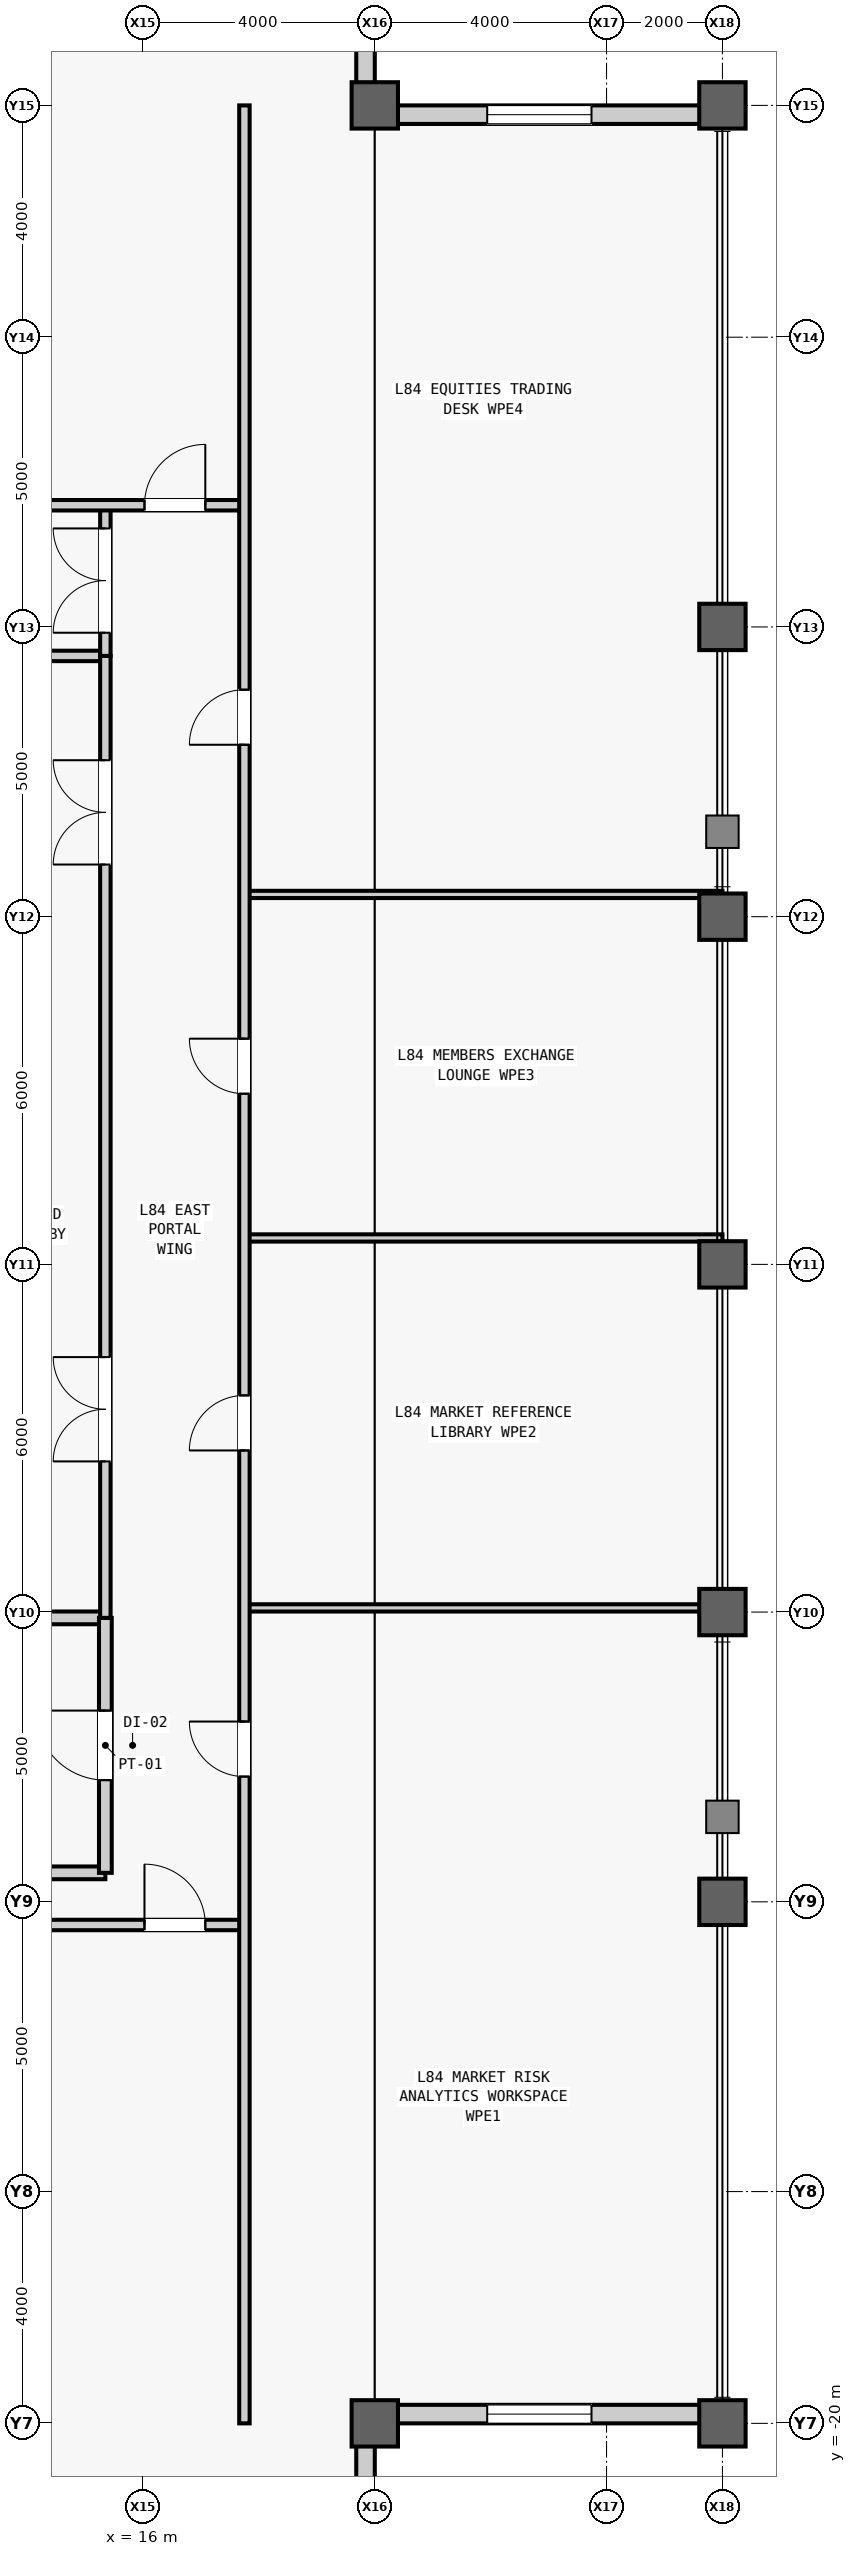
"""IFC4 building model, lengths in metres.
Left out: names, types, materials, properties, quantities, classifications, styles, units other than length and angle.
Written with IfcOpenShell. Run it as: python <this file> out.ifc"""

import sys

from ifc_helpers import new_model, si_unit, direction, frame, frame_2d, origin, origin_2d, place, context, subcontext, project, spatial, rectangle, hollow_rectangle, extrude, source, transform, mapped, element, fill, save


model = new_model("IFC4")
c1 = context("Model", 3, precision=1e-05, world=origin(), true_north=direction((0.0, 1.0)))
c2 = subcontext(c1, "Body", "Model", "MODEL_VIEW")
j1 = project(units=[si_unit("LENGTHUNIT", "METRE"), si_unit("PLANEANGLEUNIT", "RADIAN")], contexts=[c1])
p1 = place(None, origin())
s1 = spatial("IfcSite", under=j1, at=p1, CompositionType="ELEMENT")
p2 = place(p1, origin())
s2 = spatial("IfcBuilding", under=s1, at=p2, CompositionType="ELEMENT")
p3 = place(p2, frame((0.0, 0.0, 354.3)))
s3 = spatial("IfcBuildingStorey", under=s2, at=p3, CompositionType="ELEMENT", Elevation=354.3)
m1 = source(origin(), c2, "Body", "SweptSolid", [
    extrude(hollow_rectangle(XDim=0.8, YDim=0.8, WallThickness=0.045, at=origin_2d()), origin(), (0.0, 0.0, 1.0), 4.0),
])
for number, where, z_axis, x_axis in (
    (1, (20.0, -20.0, 0.0), (0.0, 0.0, 1.0), (1.0, 0.0, 0.0)),
    (2, (20.0, 20.0, 0.0), (0.0, 0.0, 1.0), (1.0, 0.0, 0.0)),
    (3, (26.0, -20.0, 0.0), (0.0, 0.0, 1.0), (1.0, 0.0, 0.0)),
    (4, (26.0, -11.0, 0.0), (0.0, 0.0, 1.0), (1.0, 0.0, 0.0)),
    (5, (26.0, -6.0, 0.0), (0.0, 0.0, 1.0), (1.0, 0.0, 0.0)),
    (6, (26.0, 0.0, 0.0), (0.0, 0.0, 1.0), (1.0, 0.0, 0.0)),
    (7, (26.0, 6.0, 0.0), (0.0, 0.0, 1.0), (1.0, 0.0, 0.0)),
    (8, (26.0, 11.0, 0.0), (0.0, 0.0, 1.0), (1.0, 0.0, 0.0)),
    (9, (26.0, 20.0, 0.0), (0.0, 0.0, 1.0), (1.0, 0.0, 0.0)),
):
    element("IfcColumn", number, at=place(p3, frame(where, z_axis=z_axis, x_axis=x_axis)), inside=s3, PredefinedType="COLUMN", context=c2, shape_type="MappedRepresentation", body=[
        mapped(m1, transform((0.0, 0.0, 0.0), scale=1.0)),
    ])
m2 = source(origin(), c2, "Body", "SweptSolid", [
    extrude(rectangle(XDim=5.68, YDim=0.32, at=frame_2d((2.84, 0.0))), origin(), (0.0, 0.0, 1.0), 3.191),
])
p4 = place(p3, frame((19.84, -25.68, 0.0), z_axis=(0.0, 0.0, 1.0), x_axis=(0.0, 1.0, 0.0)))
e10 = element("IfcWall", 10, at=p4, inside=s3, PredefinedType="STANDARD", context=c2, shape_type="MappedRepresentation", body=[
    mapped(m2, transform((0.0, 0.0, 0.0), scale=1.0)),
])
m3 = source(origin(), c2, "Body", "SweptSolid", [
    extrude(rectangle(XDim=1.8, YDim=2.4, at=frame_2d((0.9, 1.2))), frame((0.0, 0.17, 0.0), z_axis=(0.0, -1.0, 0.0), x_axis=(1.0, 0.0, 0.0)), (0.0, 0.0, 1.0), 0.34),
])
p5 = place(p4, frame((1.94, 0.0, 0.5)))
e11 = element("IfcOpeningElement", 11, at=p5, cuts=e10, PredefinedType="OPENING", context=c2, shape_type="MappedRepresentation", body=[
    mapped(m3, transform((0.0, 0.0, 0.0), scale=1.0)),
])
p6 = place(p3, frame((20.0, -19.84, 0.0), z_axis=(0.0, 0.0, 1.0), x_axis=(1.0, 0.0, 0.0)))
e12 = element("IfcWall", 12, at=p6, inside=s3, PredefinedType="STANDARD", context=c2, shape_type="MappedRepresentation", body=[
    mapped(m2, transform((0.0, 0.0, 0.0), scale=1.0)),
])
p7 = place(p6, frame((1.94, 0.0, 0.5)))
e13 = element("IfcOpeningElement", 13, at=p7, cuts=e12, PredefinedType="OPENING", context=c2, shape_type="MappedRepresentation", body=[
    mapped(m3, transform((0.0, 0.0, 0.0), scale=1.0)),
])
p8 = place(p3, frame((20.0, 19.84, 0.0), z_axis=(0.0, 0.0, 1.0), x_axis=(1.0, 0.0, 0.0)))
e14 = element("IfcWall", 14, at=p8, inside=s3, PredefinedType="STANDARD", context=c2, shape_type="MappedRepresentation", body=[
    mapped(m2, transform((0.0, 0.0, 0.0), scale=1.0)),
])
p9 = place(p8, frame((1.94, 0.0, 0.5)))
e15 = element("IfcOpeningElement", 15, at=p9, cuts=e14, PredefinedType="OPENING", context=c2, shape_type="MappedRepresentation", body=[
    mapped(m3, transform((0.0, 0.0, 0.0), scale=1.0)),
])
p10 = place(p3, frame((19.84, 20.0, 0.0), z_axis=(0.0, 0.0, 1.0), x_axis=(0.0, 1.0, 0.0)))
e16 = element("IfcWall", 16, at=p10, inside=s3, PredefinedType="STANDARD", context=c2, shape_type="MappedRepresentation", body=[
    mapped(m2, transform((0.0, 0.0, 0.0), scale=1.0)),
])
p11 = place(p10, frame((1.94, 0.0, 0.5)))
e17 = element("IfcOpeningElement", 17, at=p11, cuts=e16, PredefinedType="OPENING", context=c2, shape_type="MappedRepresentation", body=[
    mapped(m3, transform((0.0, 0.0, 0.0), scale=1.0)),
])
m4 = source(origin(), c2, "Body", "SweptSolid", [
    extrude(rectangle(XDim=4.05, YDim=0.22, at=frame_2d((2.025, 0.0))), origin(), (0.0, 0.0, 1.0), 3.74),
])
p12 = place(p3, frame((11.3, -10.5, 0.0), z_axis=(0.0, 0.0, 1.0), x_axis=(1.0, 0.0, 0.0)))
e18 = element("IfcWall", 18, at=p12, inside=s3, PredefinedType="PARTITIONING", context=c2, shape_type="MappedRepresentation", body=[
    mapped(m4, transform((0.0, 0.0, 0.0), scale=1.0)),
])
m5 = source(origin(), c2, "Body", "SweptSolid", [
    extrude(rectangle(XDim=4.05, YDim=0.22, at=frame_2d((2.025, 0.0))), origin(), (0.0, 0.0, 1.0), 3.124),
])
p13 = place(p3, frame((11.3, -6.1, 0.0), z_axis=(0.0, 0.0, 1.0), x_axis=(1.0, 0.0, 0.0)))
e19 = element("IfcWall", 19, at=p13, inside=s3, PredefinedType="PARTITIONING", context=c2, shape_type="MappedRepresentation", body=[
    mapped(m5, transform((0.0, 0.0, 0.0), scale=1.0)),
])
m6 = source(origin(), c2, "Body", "SweptSolid", [
    extrude(rectangle(XDim=4.4, YDim=0.22, at=frame_2d((2.2, 0.0))), origin(), (0.0, 0.0, 1.0), 3.74),
])
p14 = place(p3, frame((15.35, -10.5, 0.0), z_axis=(0.0, 0.0, 1.0), x_axis=(0.0, 1.0, 0.0)))
e20 = element("IfcWall", 20, at=p14, inside=s3, PredefinedType="PARTITIONING", context=c2, shape_type="MappedRepresentation", body=[
    mapped(m6, transform((0.0, 0.0, 0.0), scale=1.0)),
])
m7 = source(origin(), c2, "Body", "SweptSolid", [
    extrude(rectangle(XDim=1.2, YDim=2.2, at=frame_2d((0.6, 1.1))), frame((0.0, 0.12, 0.0), z_axis=(0.0, -1.0, 0.0), x_axis=(1.0, 0.0, 0.0)), (0.0, 0.0, 1.0), 0.24),
])
p15 = place(p14, frame((1.6, 0.0, 0.0)))
e21 = element("IfcOpeningElement", 21, at=p15, cuts=e20, PredefinedType="OPENING", context=c2, shape_type="MappedRepresentation", body=[
    mapped(m7, transform((0.0, 0.0, 0.0), scale=1.0)),
])
m8 = source(origin(), c2, "Body", "SweptSolid", [
    extrude(rectangle(XDim=4.05, YDim=0.18, at=frame_2d((2.025, 0.0))), origin(), (0.0, 0.0, 1.0), 3.74),
])
p16 = place(p3, frame((11.3, 10.5, 0.0), z_axis=(0.0, 0.0, 1.0), x_axis=(1.0, 0.0, 0.0)))
e22 = element("IfcWall", 22, at=p16, inside=s3, PredefinedType="PARTITIONING", context=c2, shape_type="MappedRepresentation", body=[
    mapped(m8, transform((0.0, 0.0, 0.0), scale=1.0)),
])
m9 = source(origin(), c2, "Body", "SweptSolid", [
    extrude(rectangle(XDim=16.6, YDim=0.18, at=frame_2d((8.3, 0.0))), origin(), (0.0, 0.0, 1.0), 3.74),
])
p17 = place(p3, frame((15.35, -6.1, 0.0), z_axis=(0.0, 0.0, 1.0), x_axis=(0.0, 1.0, 0.0)))
e23 = element("IfcWall", 23, at=p17, inside=s3, PredefinedType="PARTITIONING", context=c2, shape_type="MappedRepresentation", body=[
    mapped(m9, transform((0.0, 0.0, 0.0), scale=1.0)),
])
m10 = source(origin(), c2, "Body", "SweptSolid", [
    extrude(rectangle(XDim=1.8, YDim=2.25, at=frame_2d((0.9, 1.125))), frame((0.0, 0.1, 0.0), z_axis=(0.0, -1.0, 0.0), x_axis=(1.0, 0.0, 0.0)), (0.0, 0.0, 1.0), 0.2),
])
p18 = place(p17, frame((2.7, 0.0, 0.0)))
e24 = element("IfcOpeningElement", 24, at=p18, cuts=e23, PredefinedType="OPENING", context=c2, shape_type="MappedRepresentation", body=[
    mapped(m10, transform((0.0, 0.0, 0.0), scale=1.0)),
])
p19 = place(p17, frame((13.0, 0.0, 0.0)))
e25 = element("IfcOpeningElement", 25, at=p19, cuts=e23, PredefinedType="OPENING", context=c2, shape_type="MappedRepresentation", body=[
    mapped(m10, transform((0.0, 0.0, 0.0), scale=1.0)),
])
m11 = source(origin(), c2, "Body", "SweptSolid", [
    extrude(rectangle(XDim=2.6, YDim=0.18, at=frame_2d((1.3, 0.0))), origin(), (0.0, 0.0, 1.0), 3.74),
])
p20 = place(p3, frame((15.35, 10.5, 0.0), z_axis=(0.0, 0.0, 1.0), x_axis=(0.0, 1.0, 0.0)))
e26 = element("IfcWall", 26, at=p20, inside=s3, PredefinedType="PARTITIONING", context=c2, shape_type="MappedRepresentation", body=[
    mapped(m11, transform((0.0, 0.0, 0.0), scale=1.0)),
])
p21 = place(p20, frame((0.4, 0.0, 0.0)))
e27 = element("IfcOpeningElement", 27, at=p21, cuts=e26, PredefinedType="OPENING", context=c2, shape_type="MappedRepresentation", body=[
    mapped(m10, transform((0.0, 0.0, 0.0), scale=1.0)),
])
m12 = source(origin(), c2, "Body", "SweptSolid", [
    extrude(rectangle(XDim=12.7, YDim=0.18, at=frame_2d((6.35, 0.0))), origin(), (0.0, 0.0, 1.0), 2.79),
])
p22 = place(p3, frame((5.05, -11.4, 0.0), z_axis=(0.0, 0.0, 1.0), x_axis=(1.0, 0.0, 0.0)))
e28 = element("IfcWall", 28, at=p22, inside=s3, PredefinedType="PARTITIONING", context=c2, shape_type="MappedRepresentation", body=[
    mapped(m12, transform((0.0, 0.0, 0.0), scale=1.0)),
])
m13 = source(origin(), c2, "Body", "SweptSolid", [
    extrude(rectangle(XDim=1.05, YDim=2.2, at=frame_2d((0.525, 1.1))), frame((0.0, 0.1, 0.0), z_axis=(0.0, -1.0, 0.0), x_axis=(1.0, 0.0, 0.0)), (0.0, 0.0, 1.0), 0.2),
])
p23 = place(p22, frame((10.975, 0.0, 0.0)))
e29 = element("IfcOpeningElement", 29, at=p23, cuts=e28, PredefinedType="OPENING", context=c2, shape_type="MappedRepresentation", body=[
    mapped(m13, transform((0.0, 0.0, 0.0), scale=1.0)),
])
m14 = source(origin(), c2, "Body", "SweptSolid", [
    extrude(rectangle(XDim=12.65, YDim=0.18, at=frame_2d((6.325, 0.0))), origin(), (0.0, 0.0, 1.0), 3.74),
])
p24 = place(p3, frame((5.1, 13.1, 0.0), z_axis=(0.0, 0.0, 1.0), x_axis=(1.0, 0.0, 0.0)))
e30 = element("IfcWall", 30, at=p24, inside=s3, PredefinedType="PARTITIONING", context=c2, shape_type="MappedRepresentation", body=[
    mapped(m14, transform((0.0, 0.0, 0.0), scale=1.0)),
])
p25 = place(p24, frame((10.925, 0.0, 0.0)))
e31 = element("IfcOpeningElement", 31, at=p25, cuts=e30, PredefinedType="OPENING", context=c2, shape_type="MappedRepresentation", body=[
    mapped(m13, transform((0.0, 0.0, 0.0), scale=1.0)),
])
m15 = source(origin(), c2, "Body", "SweptSolid", [
    extrude(rectangle(XDim=8.25, YDim=0.125, at=frame_2d((4.125, 0.0))), origin(), (0.0, 0.0, 1.0), 3.124),
])
p26 = place(p3, frame((17.75, -5.928, 0.0), z_axis=(0.0, 0.0, 1.0), x_axis=(1.0, 0.0, 0.0)))
e32 = element("IfcWall", 32, at=p26, inside=s3, PredefinedType="PARTITIONING", context=c2, shape_type="MappedRepresentation", body=[
    mapped(m15, transform((0.0, 0.0, 0.0), scale=1.0)),
])
m16 = source(origin(), c2, "Body", "SweptSolid", [
    extrude(rectangle(XDim=8.25, YDim=0.125, at=frame_2d((4.125, 0.0))), origin(), (0.0, 0.0, 1.0), 3.74),
])
for number, where, z_axis, x_axis in (
    (33, (17.75, 0.456, 0.0), (0.0, 0.0, 1.0), (1.0, 0.0, 0.0)),
    (34, (17.75, 6.384, 0.0), (0.0, 0.0, 1.0), (1.0, 0.0, 0.0)),
):
    element("IfcWall", number, at=place(p3, frame(where, z_axis=z_axis, x_axis=x_axis)), inside=s3, PredefinedType="PARTITIONING", context=c2, shape_type="MappedRepresentation", body=[
        mapped(m16, transform((0.0, 0.0, 0.0), scale=1.0)),
    ])
m17 = source(origin(), c2, "Body", "SweptSolid", [
    extrude(rectangle(XDim=40.0, YDim=0.18, at=frame_2d((20.0, 0.0))), origin(), (0.0, 0.0, 1.0), 3.74),
])
p27 = place(p3, frame((17.75, -20.0, 0.0), z_axis=(0.0, 0.0, 1.0), x_axis=(0.0, 1.0, 0.0)))
e35 = element("IfcWall", 35, at=p27, inside=s3, PredefinedType="PARTITIONING", context=c2, shape_type="MappedRepresentation", body=[
    mapped(m17, transform((0.0, 0.0, 0.0), scale=1.0)),
])
m18 = source(origin(), c2, "Body", "SweptSolid", [
    extrude(rectangle(XDim=0.95, YDim=2.15, at=frame_2d((0.475, 1.075))), frame((0.0, 0.1, 0.0), z_axis=(0.0, -1.0, 0.0), x_axis=(1.0, 0.0, 0.0)), (0.0, 0.0, 1.0), 0.2),
])
p28 = place(p27, frame((11.161, 0.0, 0.0)))
e36 = element("IfcOpeningElement", 36, at=p28, cuts=e35, PredefinedType="OPENING", context=c2, shape_type="MappedRepresentation", body=[
    mapped(m18, transform((0.0, 0.0, 0.0), scale=1.0)),
])
p29 = place(p27, frame((16.789, 0.0, 0.0)))
e37 = element("IfcOpeningElement", 37, at=p29, cuts=e35, PredefinedType="OPENING", context=c2, shape_type="MappedRepresentation", body=[
    mapped(m18, transform((0.0, 0.0, 0.0), scale=1.0)),
])
p30 = place(p27, frame((22.945, 0.0, 0.0)))
e38 = element("IfcOpeningElement", 38, at=p30, cuts=e35, PredefinedType="OPENING", context=c2, shape_type="MappedRepresentation", body=[
    mapped(m18, transform((0.0, 0.0, 0.0), scale=1.0)),
])
p31 = place(p27, frame((28.967, 0.0, 0.0)))
e39 = element("IfcOpeningElement", 39, at=p31, cuts=e35, PredefinedType="OPENING", context=c2, shape_type="MappedRepresentation", body=[
    mapped(m18, transform((0.0, 0.0, 0.0), scale=1.0)),
])
m19 = source(origin(), c2, "Body", "SweptSolid", [
    extrude(rectangle(XDim=1.8, YDim=2.4, at=frame_2d((0.9, 1.2))), frame((0.0, 0.03, 0.0), z_axis=(0.0, -1.0, 0.0), x_axis=(1.0, 0.0, 0.0)), (0.0, 0.0, 1.0), 0.06),
])
p32 = place(p7, origin())
e40 = element("IfcWindow", 40, at=p32, inside=s3, PartitioningType="SINGLE_PANEL", PredefinedType="WINDOW", context=c2, shape_type="MappedRepresentation", body=[
    mapped(m19, transform((0.0, 0.0, 0.0), scale=1.0)),
])
fill(e13, e40)
p33 = place(p9, origin())
e41 = element("IfcWindow", 41, at=p33, inside=s3, PartitioningType="SINGLE_PANEL", PredefinedType="WINDOW", context=c2, shape_type="MappedRepresentation", body=[
    mapped(m19, transform((0.0, 0.0, 0.0), scale=1.0)),
])
fill(e15, e41)
m20 = source(origin(), c2, "Body", "SweptSolid", [
    extrude(rectangle(XDim=1.2, YDim=2.2, at=frame_2d((0.6, 1.1))), frame((0.0, 0.025, 0.0), z_axis=(0.0, -1.0, 0.0), x_axis=(1.0, 0.0, 0.0)), (0.0, 0.0, 1.0), 0.05),
])
p34 = place(p15, origin())
e42 = element("IfcDoor", 42, at=p34, inside=s3, OperationType="SINGLE_SWING_RIGHT", PredefinedType="DOOR", context=c2, shape_type="MappedRepresentation", body=[
    mapped(m20, transform((0.0, 0.0, 0.0), scale=1.0)),
])
fill(e21, e42)
m21 = source(origin(), c2, "Body", "SweptSolid", [
    extrude(rectangle(XDim=1.8, YDim=2.25, at=frame_2d((0.9, 1.125))), frame((0.0, 0.025, 0.0), z_axis=(0.0, -1.0, 0.0), x_axis=(1.0, 0.0, 0.0)), (0.0, 0.0, 1.0), 0.05),
])
p35 = place(p18, origin())
e43 = element("IfcDoor", 43, at=p35, inside=s3, OperationType="SINGLE_SWING_RIGHT", PredefinedType="DOOR", context=c2, shape_type="MappedRepresentation", body=[
    mapped(m21, transform((0.0, 0.0, 0.0), scale=1.0)),
])
fill(e24, e43)
p36 = place(p19, origin())
e44 = element("IfcDoor", 44, at=p36, inside=s3, OperationType="SINGLE_SWING_LEFT", PredefinedType="DOOR", context=c2, shape_type="MappedRepresentation", body=[
    mapped(m21, transform((0.0, 0.0, 0.0), scale=1.0)),
])
fill(e25, e44)
p37 = place(p21, origin())
e45 = element("IfcDoor", 45, at=p37, inside=s3, OperationType="DOUBLE_DOOR_SINGLE_SWING", PredefinedType="DOOR", context=c2, shape_type="MappedRepresentation", body=[
    mapped(m21, transform((0.0, 0.0, 0.0), scale=1.0)),
])
fill(e27, e45)
m22 = source(origin(), c2, "Body", "SweptSolid", [
    extrude(rectangle(XDim=1.05, YDim=2.2, at=frame_2d((0.525, 1.1))), frame((0.0, 0.025, 0.0), z_axis=(0.0, -1.0, 0.0), x_axis=(1.0, 0.0, 0.0)), (0.0, 0.0, 1.0), 0.05),
])
p38 = place(p23, origin())
e46 = element("IfcDoor", 46, at=p38, inside=s3, OperationType="SINGLE_SWING_LEFT", PredefinedType="DOOR", context=c2, shape_type="MappedRepresentation", body=[
    mapped(m22, transform((0.0, 0.0, 0.0), scale=1.0)),
])
fill(e29, e46)
p39 = place(p25, origin())
e47 = element("IfcDoor", 47, at=p39, inside=s3, OperationType="SINGLE_SWING_RIGHT", PredefinedType="DOOR", context=c2, shape_type="MappedRepresentation", body=[
    mapped(m22, transform((0.0, 0.0, 0.0), scale=1.0)),
])
fill(e31, e47)
m23 = source(origin(), c2, "Body", "SweptSolid", [
    extrude(rectangle(XDim=0.95, YDim=2.15, at=frame_2d((0.475, 1.075))), frame((0.0, 0.025, 0.0), z_axis=(0.0, -1.0, 0.0), x_axis=(1.0, 0.0, 0.0)), (0.0, 0.0, 1.0), 0.05),
])
p40 = place(p28, origin())
e48 = element("IfcDoor", 48, at=p40, inside=s3, OperationType="SINGLE_SWING_RIGHT", PredefinedType="DOOR", context=c2, shape_type="MappedRepresentation", body=[
    mapped(m23, transform((0.0, 0.0, 0.0), scale=1.0)),
])
fill(e36, e48)
p41 = place(p29, origin())
e49 = element("IfcDoor", 49, at=p41, inside=s3, OperationType="SINGLE_SWING_LEFT", PredefinedType="DOOR", context=c2, shape_type="MappedRepresentation", body=[
    mapped(m23, transform((0.0, 0.0, 0.0), scale=1.0)),
])
fill(e37, e49)
p42 = place(p30, origin())
e50 = element("IfcDoor", 50, at=p42, inside=s3, OperationType="SINGLE_SWING_RIGHT", PredefinedType="DOOR", context=c2, shape_type="MappedRepresentation", body=[
    mapped(m23, transform((0.0, 0.0, 0.0), scale=1.0)),
])
fill(e38, e50)
p43 = place(p31, origin())
e51 = element("IfcDoor", 51, at=p43, inside=s3, OperationType="SINGLE_SWING_LEFT", PredefinedType="DOOR", context=c2, shape_type="MappedRepresentation", body=[
    mapped(m23, transform((0.0, 0.0, 0.0), scale=1.0)),
])
fill(e39, e51)
save(model, sys.argv[1])
